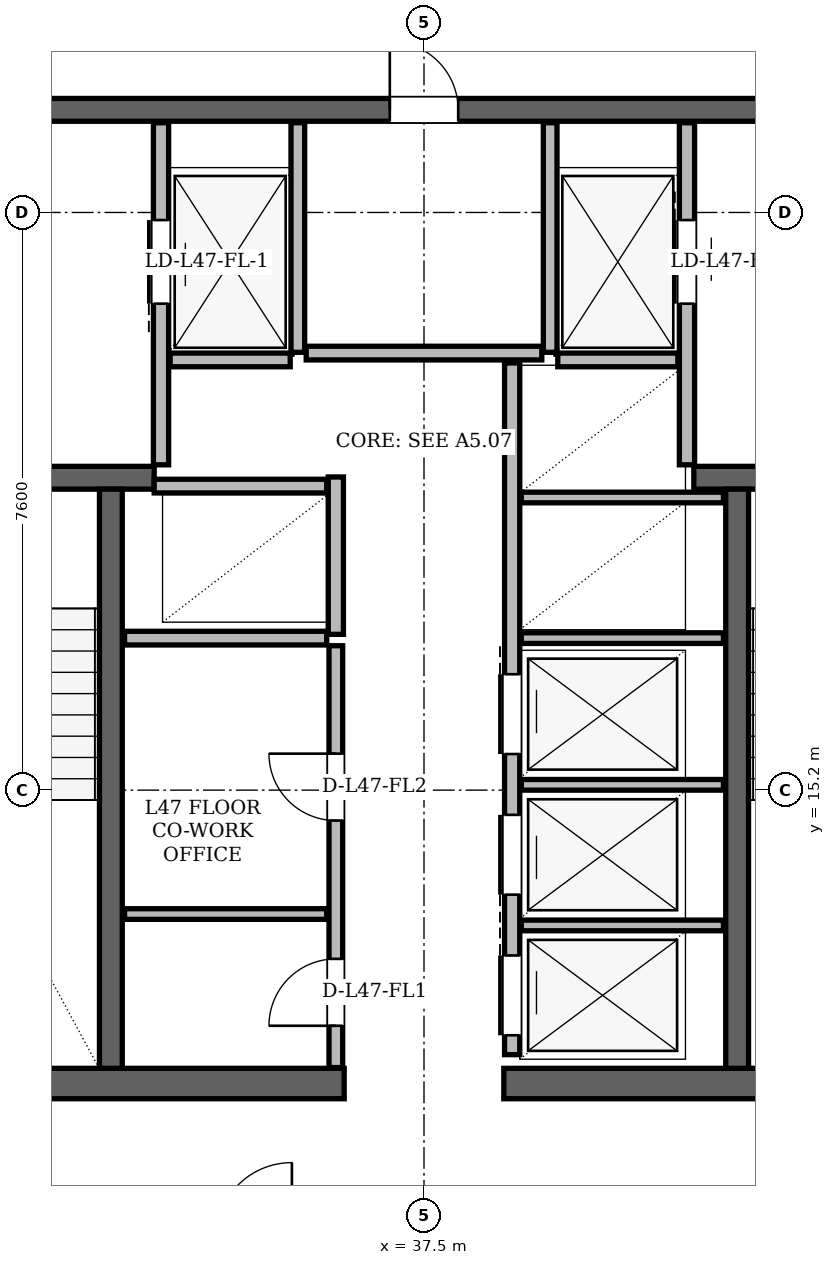
"""IFC4 building model, lengths in metres.
Left out: names, types, materials, properties, quantities, classifications, styles, units other than length and angle.
Written with IfcOpenShell. Run it as: python <this file> out.ifc"""

import sys

from ifc_helpers import new_model, si_unit, direction, frame, frame_2d, origin, place, context, subcontext, project, spatial, rectangle, extrude, element, fill, save


model = new_model("IFC4")
c1 = context("Model", 3, precision=1e-05, world=origin(), true_north=direction((0.0, 1.0)))
c2 = subcontext(c1, "Body", "Model", "MODEL_VIEW")
j1 = project(units=[si_unit("LENGTHUNIT", "METRE"), si_unit("PLANEANGLEUNIT", "RADIAN")], contexts=[c1])
p1 = place(None, origin())
s1 = spatial("IfcSite", under=j1, at=p1, CompositionType="ELEMENT")
p2 = place(p1, origin())
s2 = spatial("IfcBuilding", under=s1, at=p2, CompositionType="ELEMENT")
p3 = place(p2, frame((0.0, 0.0, 178.2)))
s3 = spatial("IfcBuildingStorey", under=s2, at=p3, CompositionType="ELEMENT", Elevation=178.2)
for number, where, z_axis, x_axis in (
    (1, (29.35, 11.34, 0.0), (0.0, 0.0, 1.0), (1.0, 0.0, 0.0)),
    (2, (38.55, 11.34, 0.0), (0.0, 0.0, 1.0), (1.0, 0.0, 0.0)),
):
    element("IfcWall", number, at=place(p3, frame(where, z_axis=z_axis, x_axis=x_axis)), inside=s3, PredefinedType="SHEAR", context=c2, shape_type="SweptSolid", body=[
        extrude(rectangle(XDim=7.1, YDim=0.4, at=frame_2d((3.55, 0.0))), origin(), (0.0, 0.0, 1.0), 3.38),
    ])
p4 = place(p3, frame((29.65, 24.15, 0.0), z_axis=(0.0, 0.0, 1.0), x_axis=(1.0, 0.0, 0.0)))
e3 = element("IfcWall", 3, at=p4, inside=s3, PredefinedType="SHEAR", context=c2, shape_type="SweptSolid", body=[
    extrude(rectangle(XDim=15.7, YDim=0.3, at=frame_2d((7.85, 0.0))), origin(), (0.0, 0.0, 1.0), 3.38),
])
p5 = place(p4, frame((1.7, 0.0, 0.0)))
e4 = element("IfcOpeningElement", 4, at=p5, cuts=e3, PredefinedType="OPENING", context=c2, shape_type="SweptSolid", body=[
    extrude(rectangle(XDim=1.2, YDim=2.2, at=frame_2d((0.6, 1.1))), frame((0.0, 0.15, 0.0), z_axis=(0.0, -1.0, 0.0), x_axis=(1.0, 0.0, 0.0)), (0.0, 0.0, 1.0), 0.3),
])
p6 = place(p4, frame((12.8, 0.0, 0.0)))
e5 = element("IfcOpeningElement", 5, at=p6, cuts=e3, PredefinedType="OPENING", context=c2, shape_type="SweptSolid", body=[
    extrude(rectangle(XDim=1.2, YDim=2.2, at=frame_2d((0.6, 1.1))), frame((0.0, 0.15, 0.0), z_axis=(0.0, -1.0, 0.0), x_axis=(1.0, 0.0, 0.0)), (0.0, 0.0, 1.0), 0.3),
])
p7 = place(p4, frame((7.4, 0.0, 0.0)))
e6 = element("IfcOpeningElement", 6, at=p7, cuts=e3, PredefinedType="OPENING", context=c2, shape_type="SweptSolid", body=[
    extrude(rectangle(XDim=0.9, YDim=2.05, at=frame_2d((0.45, 1.025))), frame((0.0, 0.15, 0.0), z_axis=(0.0, -1.0, 0.0), x_axis=(1.0, 0.0, 0.0)), (0.0, 0.0, 1.0), 0.3),
])
p8 = place(p3, frame((29.94, 19.31, 0.0), z_axis=(0.0, 0.0, 1.0), x_axis=(1.0, 0.0, 0.0)))
e7 = element("IfcWall", 7, at=p8, inside=s3, PredefinedType="SHEAR", context=c2, shape_type="SweptSolid", body=[
    extrude(rectangle(XDim=4.01, YDim=0.3, at=frame_2d((2.005, 0.0))), origin(), (0.0, 0.0, 1.0), 3.38),
])
p9 = place(p8, frame((1.01, 0.0, 0.0)))
e8 = element("IfcOpeningElement", 8, at=p9, cuts=e7, PredefinedType="OPENING", context=c2, shape_type="SweptSolid", body=[
    extrude(rectangle(XDim=1.4, YDim=2.2, at=frame_2d((0.7, 1.1))), frame((0.0, 0.15, 0.0), z_axis=(0.0, -1.0, 0.0), x_axis=(1.0, 0.0, 0.0)), (0.0, 0.0, 1.0), 0.3),
])
p10 = place(p3, frame((41.05, 19.31, 0.0), z_axis=(0.0, 0.0, 1.0), x_axis=(1.0, 0.0, 0.0)))
e9 = element("IfcWall", 9, at=p10, inside=s3, PredefinedType="SHEAR", context=c2, shape_type="SweptSolid", body=[
    extrude(rectangle(XDim=4.01, YDim=0.3, at=frame_2d((2.005, 0.0))), origin(), (0.0, 0.0, 1.0), 3.38),
])
p11 = place(p10, frame((1.6, 0.0, 0.0)))
e10 = element("IfcOpeningElement", 10, at=p11, cuts=e9, PredefinedType="OPENING", context=c2, shape_type="SweptSolid", body=[
    extrude(rectangle(XDim=1.4, YDim=2.2, at=frame_2d((0.7, 1.1))), frame((0.0, 0.15, 0.0), z_axis=(0.0, -1.0, 0.0), x_axis=(1.0, 0.0, 0.0)), (0.0, 0.0, 1.0), 0.3),
])
for number, where, z_axis, x_axis in (
    (11, (33.38, 11.54, 0.0), (0.0, 0.0, 1.0), (0.0, 1.0, 0.0)),
    (12, (41.62, 11.54, 0.0), (0.0, 0.0, 1.0), (0.0, 1.0, 0.0)),
):
    element("IfcWall", number, at=place(p3, frame(where, z_axis=z_axis, x_axis=x_axis)), inside=s3, PredefinedType="SHEAR", context=c2, shape_type="SweptSolid", body=[
        extrude(rectangle(XDim=7.62, YDim=0.3, at=frame_2d((3.81, 0.0))), origin(), (0.0, 0.0, 1.0), 3.38),
    ])
p12 = place(p3, frame((59.612, 12.087, 0.0), z_axis=(0.0, 0.0, 1.0), x_axis=(-0.499997641637, 0.866026765382, 0.0)))
e13 = element("IfcWall", 13, at=p12, inside=s3, PredefinedType="SOLIDWALL", context=c2, shape_type="SweptSolid", body=[
    extrude(rectangle(XDim=35.992, YDim=0.29, at=frame_2d((17.996, 0.0))), origin(), (0.0, 0.0, 1.0), 2.6),
])
p13 = place(p12, frame((8.034, 0.0, 0.0)))
e14 = element("IfcOpeningElement", 14, at=p13, cuts=e13, PredefinedType="OPENING", context=c2, shape_type="SweptSolid", body=[
    extrude(rectangle(XDim=1.5, YDim=2.2, at=frame_2d((0.75, 1.1))), frame((0.0, 0.145, 0.0), z_axis=(0.0, -1.0, 0.0), x_axis=(1.0, 0.0, 0.0)), (0.0, 0.0, 1.0), 0.29),
])
p14 = place(p12, frame((31.062, 0.0, 0.0)))
e15 = element("IfcOpeningElement", 15, at=p14, cuts=e13, PredefinedType="OPENING", context=c2, shape_type="SweptSolid", body=[
    extrude(rectangle(XDim=1.5, YDim=2.2, at=frame_2d((0.75, 1.1))), frame((0.0, 0.145, 0.0), z_axis=(0.0, -1.0, 0.0), x_axis=(1.0, 0.0, 0.0)), (0.0, 0.0, 1.0), 0.29),
])
p15 = place(p12, frame((28.16, 0.0, 0.85)))
e16 = element("IfcOpeningElement", 16, at=p15, cuts=e13, PredefinedType="OPENING", context=c2, shape_type="SweptSolid", body=[
    extrude(rectangle(XDim=1.2, YDim=1.48, at=frame_2d((0.6, 0.74))), frame((0.0, 0.145, 0.0), z_axis=(0.0, -1.0, 0.0), x_axis=(1.0, 0.0, 0.0)), (0.0, 0.0, 1.0), 0.29),
])
p16 = place(p12, frame((33.069, 0.0, 0.85)))
e17 = element("IfcOpeningElement", 17, at=p16, cuts=e13, PredefinedType="OPENING", context=c2, shape_type="SweptSolid", body=[
    extrude(rectangle(XDim=1.2, YDim=1.48, at=frame_2d((0.6, 0.74))), frame((0.0, 0.145, 0.0), z_axis=(0.0, -1.0, 0.0), x_axis=(1.0, 0.0, 0.0)), (0.0, 0.0, 1.0), 0.29),
])
p17 = place(p12, frame((14.916, 0.0, 0.85)))
e18 = element("IfcOpeningElement", 18, at=p17, cuts=e13, PredefinedType="OPENING", context=c2, shape_type="SweptSolid", body=[
    extrude(rectangle(XDim=1.4, YDim=1.6, at=frame_2d((0.7, 0.8))), frame((0.0, 0.145, 0.0), z_axis=(0.0, -1.0, 0.0), x_axis=(1.0, 0.0, 0.0)), (0.0, 0.0, 1.0), 0.29),
])
p18 = place(p12, frame((17.971, 0.0, 0.85)))
e19 = element("IfcOpeningElement", 19, at=p18, cuts=e13, PredefinedType="OPENING", context=c2, shape_type="SweptSolid", body=[
    extrude(rectangle(XDim=1.2, YDim=1.48, at=frame_2d((0.6, 0.74))), frame((0.0, 0.145, 0.0), z_axis=(0.0, -1.0, 0.0), x_axis=(1.0, 0.0, 0.0)), (0.0, 0.0, 1.0), 0.29),
])
p19 = place(p12, frame((21.213, 0.0, 0.85)))
e20 = element("IfcOpeningElement", 20, at=p19, cuts=e13, PredefinedType="OPENING", context=c2, shape_type="SweptSolid", body=[
    extrude(rectangle(XDim=1.2, YDim=1.48, at=frame_2d((0.6, 0.74))), frame((0.0, 0.145, 0.0), z_axis=(0.0, -1.0, 0.0), x_axis=(1.0, 0.0, 0.0)), (0.0, 0.0, 1.0), 0.29),
])
p20 = place(p12, frame((26.453, 0.0, 0.85)))
e21 = element("IfcOpeningElement", 21, at=p20, cuts=e13, PredefinedType="OPENING", context=c2, shape_type="SweptSolid", body=[
    extrude(rectangle(XDim=1.2, YDim=1.48, at=frame_2d((0.6, 0.74))), frame((0.0, 0.145, 0.0), z_axis=(0.0, -1.0, 0.0), x_axis=(1.0, 0.0, 0.0)), (0.0, 0.0, 1.0), 0.29),
])
p21 = place(p3, frame((33.384, 43.257, 0.0), z_axis=(0.0, 0.0, 1.0), x_axis=(-0.499997641637, -0.866026765382, 0.0)))
e22 = element("IfcWall", 22, at=p21, inside=s3, PredefinedType="SOLIDWALL", context=c2, shape_type="SweptSolid", body=[
    extrude(rectangle(XDim=35.992, YDim=0.29, at=frame_2d((17.996, 0.0))), origin(), (0.0, 0.0, 1.0), 2.6),
])
p22 = place(p21, frame((8.034, 0.0, 0.0)))
e23 = element("IfcOpeningElement", 23, at=p22, cuts=e22, PredefinedType="OPENING", context=c2, shape_type="SweptSolid", body=[
    extrude(rectangle(XDim=1.5, YDim=2.2, at=frame_2d((0.75, 1.1))), frame((0.0, 0.145, 0.0), z_axis=(0.0, -1.0, 0.0), x_axis=(1.0, 0.0, 0.0)), (0.0, 0.0, 1.0), 0.29),
])
p23 = place(p21, frame((27.913, 0.0, 0.0)))
e24 = element("IfcOpeningElement", 24, at=p23, cuts=e22, PredefinedType="OPENING", context=c2, shape_type="SweptSolid", body=[
    extrude(rectangle(XDim=1.5, YDim=2.2, at=frame_2d((0.75, 1.1))), frame((0.0, 0.145, 0.0), z_axis=(0.0, -1.0, 0.0), x_axis=(1.0, 0.0, 0.0)), (0.0, 0.0, 1.0), 0.29),
])
p24 = place(p21, frame((33.875, 0.0, 0.85)))
e25 = element("IfcOpeningElement", 25, at=p24, cuts=e22, PredefinedType="OPENING", context=c2, shape_type="SweptSolid", body=[
    extrude(rectangle(XDim=1.2, YDim=1.48, at=frame_2d((0.6, 0.74))), frame((0.0, 0.145, 0.0), z_axis=(0.0, -1.0, 0.0), x_axis=(1.0, 0.0, 0.0)), (0.0, 0.0, 1.0), 0.29),
])
p25 = place(p21, frame((18.191, 0.0, 0.85)))
e26 = element("IfcOpeningElement", 26, at=p25, cuts=e22, PredefinedType="OPENING", context=c2, shape_type="SweptSolid", body=[
    extrude(rectangle(XDim=2.6, YDim=1.64, at=frame_2d((1.3, 0.82))), frame((0.0, 0.145, 0.0), z_axis=(0.0, -1.0, 0.0), x_axis=(1.0, 0.0, 0.0)), (0.0, 0.0, 1.0), 0.29),
])
p26 = place(p21, frame((26.178, 0.0, 0.85)))
e27 = element("IfcOpeningElement", 27, at=p26, cuts=e22, PredefinedType="OPENING", context=c2, shape_type="SweptSolid", body=[
    extrude(rectangle(XDim=1.2, YDim=1.48, at=frame_2d((0.6, 0.74))), frame((0.0, 0.145, 0.0), z_axis=(0.0, -1.0, 0.0), x_axis=(1.0, 0.0, 0.0)), (0.0, 0.0, 1.0), 0.29),
])
p27 = place(p21, frame((12.657, 0.0, 0.85)))
e28 = element("IfcOpeningElement", 28, at=p27, cuts=e22, PredefinedType="OPENING", context=c2, shape_type="SweptSolid", body=[
    extrude(rectangle(XDim=1.2, YDim=1.48, at=frame_2d((0.6, 0.74))), frame((0.0, 0.145, 0.0), z_axis=(0.0, -1.0, 0.0), x_axis=(1.0, 0.0, 0.0)), (0.0, 0.0, 1.0), 0.29),
])
p28 = place(p21, frame((14.939, 0.0, 0.85)))
e29 = element("IfcOpeningElement", 29, at=p28, cuts=e22, PredefinedType="OPENING", context=c2, shape_type="SweptSolid", body=[
    extrude(rectangle(XDim=1.8, YDim=1.64, at=frame_2d((0.9, 0.82))), frame((0.0, 0.145, 0.0), z_axis=(0.0, -1.0, 0.0), x_axis=(1.0, 0.0, 0.0)), (0.0, 0.0, 1.0), 0.29),
])
p29 = place(p21, frame((2.236, 0.0, 0.85)))
e30 = element("IfcOpeningElement", 30, at=p29, cuts=e22, PredefinedType="OPENING", context=c2, shape_type="SweptSolid", body=[
    extrude(rectangle(XDim=2.0, YDim=1.64, at=frame_2d((1.0, 0.82))), frame((0.0, 0.145, 0.0), z_axis=(0.0, -1.0, 0.0), x_axis=(1.0, 0.0, 0.0)), (0.0, 0.0, 1.0), 0.29),
])
p30 = place(p3, frame((34.04, 19.48, 0.0), z_axis=(0.0, 0.0, 1.0), x_axis=(0.0, 1.0, 0.0)))
e31 = element("IfcWall", 31, at=p30, inside=s3, PredefinedType="PARTITIONING", context=c2, shape_type="SweptSolid", body=[
    extrude(rectangle(XDim=4.5, YDim=0.2, at=frame_2d((2.25, 0.0))), origin(), (0.0, 0.0, 1.0), 3.38),
])
p31 = place(p30, frame((2.12, 0.0, 0.0)))
e32 = element("IfcOpeningElement", 32, at=p31, cuts=e31, PredefinedType="OPENING", context=c2, shape_type="SweptSolid", body=[
    extrude(rectangle(XDim=1.1, YDim=2.2, at=frame_2d((0.55, 1.1))), frame((0.0, 0.1, 0.0), z_axis=(0.0, -1.0, 0.0), x_axis=(1.0, 0.0, 0.0)), (0.0, 0.0, 1.0), 0.2),
])
p32 = place(p3, frame((35.84, 20.96, 0.0), z_axis=(0.0, 0.0, 1.0), x_axis=(0.0, 1.0, 0.0)))
e33 = element("IfcWall", 33, at=p32, inside=s3, PredefinedType="PARTITIONING", context=c2, shape_type="SweptSolid", body=[
    extrude(rectangle(XDim=3.02, YDim=0.18, at=frame_2d((1.51, 0.0))), origin(), (0.0, 0.0, 1.0), 3.38),
])
p33 = place(p3, frame((34.16, 20.86, 0.0), z_axis=(0.0, 0.0, 1.0), x_axis=(1.0, 0.0, 0.0)))
e34 = element("IfcWall", 34, at=p33, inside=s3, PredefinedType="PARTITIONING", context=c2, shape_type="SweptSolid", body=[
    extrude(rectangle(XDim=1.58, YDim=0.18, at=frame_2d((0.79, 0.0))), origin(), (0.0, 0.0, 1.0), 3.38),
])
p34 = place(p3, frame((40.96, 19.48, 0.0), z_axis=(0.0, 0.0, 1.0), x_axis=(0.0, 1.0, 0.0)))
e35 = element("IfcWall", 35, at=p34, inside=s3, PredefinedType="PARTITIONING", context=c2, shape_type="SweptSolid", body=[
    extrude(rectangle(XDim=4.5, YDim=0.2, at=frame_2d((2.25, 0.0))), origin(), (0.0, 0.0, 1.0), 3.38),
])
p35 = place(p34, frame((2.12, 0.0, 0.0)))
e36 = element("IfcOpeningElement", 36, at=p35, cuts=e35, PredefinedType="OPENING", context=c2, shape_type="SweptSolid", body=[
    extrude(rectangle(XDim=1.1, YDim=2.2, at=frame_2d((0.55, 1.1))), frame((0.0, 0.1, 0.0), z_axis=(0.0, -1.0, 0.0), x_axis=(1.0, 0.0, 0.0)), (0.0, 0.0, 1.0), 0.2),
])
p36 = place(p3, frame((39.16, 20.96, 0.0), z_axis=(0.0, 0.0, 1.0), x_axis=(0.0, 1.0, 0.0)))
e37 = element("IfcWall", 37, at=p36, inside=s3, PredefinedType="PARTITIONING", context=c2, shape_type="SweptSolid", body=[
    extrude(rectangle(XDim=3.02, YDim=0.18, at=frame_2d((1.51, 0.0))), origin(), (0.0, 0.0, 1.0), 3.38),
])
p37 = place(p3, frame((39.26, 20.86, 0.0), z_axis=(0.0, 0.0, 1.0), x_axis=(1.0, 0.0, 0.0)))
e38 = element("IfcWall", 38, at=p37, inside=s3, PredefinedType="PARTITIONING", context=c2, shape_type="SweptSolid", body=[
    extrude(rectangle(XDim=1.58, YDim=0.18, at=frame_2d((0.79, 0.0))), origin(), (0.0, 0.0, 1.0), 3.38),
])
p38 = place(p3, frame((36.34, 17.25, 0.0), z_axis=(0.0, 0.0, 1.0), x_axis=(0.0, 1.0, 0.0)))
e39 = element("IfcWall", 39, at=p38, inside=s3, PredefinedType="PARTITIONING", context=c2, shape_type="SweptSolid", body=[
    extrude(rectangle(XDim=2.07, YDim=0.2, at=frame_2d((1.035, 0.0))), origin(), (0.0, 0.0, 1.0), 3.38),
])
p39 = place(p3, frame((33.95, 19.2, 0.0), z_axis=(0.0, 0.0, 1.0), x_axis=(1.0, 0.0, 0.0)))
e40 = element("IfcWall", 40, at=p39, inside=s3, PredefinedType="PARTITIONING", context=c2, shape_type="SweptSolid", body=[
    extrude(rectangle(XDim=2.27, YDim=0.18, at=frame_2d((1.135, 0.0))), origin(), (0.0, 0.0, 1.0), 3.38),
])
p40 = place(p3, frame((33.56, 17.2, 0.0), z_axis=(0.0, 0.0, 1.0), x_axis=(1.0, 0.0, 0.0)))
e41 = element("IfcWall", 41, at=p40, inside=s3, PredefinedType="PARTITIONING", context=c2, shape_type="SweptSolid", body=[
    extrude(rectangle(XDim=2.66, YDim=0.18, at=frame_2d((1.33, 0.0))), origin(), (0.0, 0.0, 1.0), 3.38),
])
p41 = place(p3, frame((36.34, 11.55, 0.0), z_axis=(0.0, 0.0, 1.0), x_axis=(0.0, 1.0, 0.0)))
e42 = element("IfcWall", 42, at=p41, inside=s3, PredefinedType="PARTITIONING", context=c2, shape_type="SweptSolid", body=[
    extrude(rectangle(XDim=5.55, YDim=0.18, at=frame_2d((2.775, 0.0))), origin(), (0.0, 0.0, 1.0), 3.38),
])
p42 = place(p41, frame((0.55, 0.0, 0.0)))
e43 = element("IfcOpeningElement", 43, at=p42, cuts=e42, PredefinedType="OPENING", context=c2, shape_type="SweptSolid", body=[
    extrude(rectangle(XDim=0.88, YDim=2.08, at=frame_2d((0.44, 1.04))), frame((0.0, 0.09, 0.0), z_axis=(0.0, -1.0, 0.0), x_axis=(1.0, 0.0, 0.0)), (0.0, 0.0, 1.0), 0.18),
])
p43 = place(p41, frame((3.25, 0.0, 0.0)))
e44 = element("IfcOpeningElement", 44, at=p43, cuts=e42, PredefinedType="OPENING", context=c2, shape_type="SweptSolid", body=[
    extrude(rectangle(XDim=0.88, YDim=2.08, at=frame_2d((0.44, 1.04))), frame((0.0, 0.09, 0.0), z_axis=(0.0, -1.0, 0.0), x_axis=(1.0, 0.0, 0.0)), (0.0, 0.0, 1.0), 0.18),
])
p44 = place(p3, frame((33.56, 13.57, 0.0), z_axis=(0.0, 0.0, 1.0), x_axis=(1.0, 0.0, 0.0)))
e45 = element("IfcWall", 45, at=p44, inside=s3, PredefinedType="PARTITIONING", context=c2, shape_type="SweptSolid", body=[
    extrude(rectangle(XDim=2.66, YDim=0.14, at=frame_2d((1.33, 0.0))), origin(), (0.0, 0.0, 1.0), 3.38),
])
p45 = place(p3, frame((38.66, 11.72, 0.0), z_axis=(0.0, 0.0, 1.0), x_axis=(0.0, 1.0, 0.0)))
e46 = element("IfcWall", 46, at=p45, inside=s3, PredefinedType="PARTITIONING", context=c2, shape_type="SweptSolid", body=[
    extrude(rectangle(XDim=9.1, YDim=0.2, at=frame_2d((4.55, 0.0))), origin(), (0.0, 0.0, 1.0), 3.38),
])
p46 = place(p45, frame((0.255, 0.0, 0.0)))
e47 = element("IfcOpeningElement", 47, at=p46, cuts=e46, PredefinedType="OPENING", context=c2, shape_type="SweptSolid", body=[
    extrude(rectangle(XDim=1.05, YDim=2.15, at=frame_2d((0.525, 1.075))), frame((0.0, 0.1, 0.0), z_axis=(0.0, -1.0, 0.0), x_axis=(1.0, 0.0, 0.0)), (0.0, 0.0, 1.0), 0.2),
])
p47 = place(p45, frame((2.105, 0.0, 0.0)))
e48 = element("IfcOpeningElement", 48, at=p47, cuts=e46, PredefinedType="OPENING", context=c2, shape_type="SweptSolid", body=[
    extrude(rectangle(XDim=1.05, YDim=2.15, at=frame_2d((0.525, 1.075))), frame((0.0, 0.1, 0.0), z_axis=(0.0, -1.0, 0.0), x_axis=(1.0, 0.0, 0.0)), (0.0, 0.0, 1.0), 0.2),
])
p48 = place(p45, frame((3.955, 0.0, 0.0)))
e49 = element("IfcOpeningElement", 49, at=p48, cuts=e46, PredefinedType="OPENING", context=c2, shape_type="SweptSolid", body=[
    extrude(rectangle(XDim=1.05, YDim=2.15, at=frame_2d((0.525, 1.075))), frame((0.0, 0.1, 0.0), z_axis=(0.0, -1.0, 0.0), x_axis=(1.0, 0.0, 0.0)), (0.0, 0.0, 1.0), 0.2),
])
for number, where, z_axis, x_axis in (
    (50, (38.78, 13.42, 0.0), (0.0, 0.0, 1.0), (1.0, 0.0, 0.0)),
    (51, (38.78, 15.27, 0.0), (0.0, 0.0, 1.0), (1.0, 0.0, 0.0)),
    (52, (38.78, 17.2, 0.0), (0.0, 0.0, 1.0), (1.0, 0.0, 0.0)),
    (53, (38.78, 19.05, 0.0), (0.0, 0.0, 1.0), (1.0, 0.0, 0.0)),
):
    element("IfcWall", number, at=place(p3, frame(where, z_axis=z_axis, x_axis=x_axis)), inside=s3, PredefinedType="PARTITIONING", context=c2, shape_type="SweptSolid", body=[
        extrude(rectangle(XDim=2.66, YDim=0.14, at=frame_2d((1.33, 0.0))), origin(), (0.0, 0.0, 1.0), 3.38),
    ])
p49 = place(p3, frame((35.95, 20.95, 0.0), z_axis=(0.0, 0.0, 1.0), x_axis=(1.0, 0.0, 0.0)))
e54 = element("IfcWall", 54, at=p49, inside=s3, PredefinedType="PARTITIONING", context=c2, shape_type="SweptSolid", body=[
    extrude(rectangle(XDim=3.1, YDim=0.18, at=frame_2d((1.55, 0.0))), origin(), (0.0, 0.0, 1.0), 3.38),
])
p50 = place(p42, origin())
e55 = element("IfcDoor", 55, at=p50, inside=s3, OperationType="SINGLE_SWING_LEFT", PredefinedType="DOOR", context=c2, shape_type="SweptSolid", body=[
    extrude(rectangle(XDim=0.88, YDim=2.08, at=frame_2d((0.44, 1.04))), frame((0.0, 0.025, 0.0), z_axis=(0.0, -1.0, 0.0), x_axis=(1.0, 0.0, 0.0)), (0.0, 0.0, 1.0), 0.05),
])
fill(e43, e55)
p51 = place(p43, origin())
e56 = element("IfcDoor", 56, at=p51, inside=s3, OperationType="SINGLE_SWING_RIGHT", PredefinedType="DOOR", context=c2, shape_type="SweptSolid", body=[
    extrude(rectangle(XDim=0.88, YDim=2.08, at=frame_2d((0.44, 1.04))), frame((0.0, 0.025, 0.0), z_axis=(0.0, -1.0, 0.0), x_axis=(1.0, 0.0, 0.0)), (0.0, 0.0, 1.0), 0.05),
])
fill(e44, e56)
p52 = place(p31, origin())
e57 = element("IfcDoor", 57, at=p52, inside=s3, OperationType="SLIDING_TO_LEFT", PredefinedType="DOOR", context=c2, shape_type="SweptSolid", body=[
    extrude(rectangle(XDim=1.1, YDim=2.2, at=frame_2d((0.55, 1.1))), frame((0.0, 0.025, 0.0), z_axis=(0.0, -1.0, 0.0), x_axis=(1.0, 0.0, 0.0)), (0.0, 0.0, 1.0), 0.05),
])
fill(e32, e57)
p53 = place(p35, origin())
e58 = element("IfcDoor", 58, at=p53, inside=s3, OperationType="SLIDING_TO_RIGHT", PredefinedType="DOOR", context=c2, shape_type="SweptSolid", body=[
    extrude(rectangle(XDim=1.1, YDim=2.2, at=frame_2d((0.55, 1.1))), frame((0.0, 0.025, 0.0), z_axis=(0.0, -1.0, 0.0), x_axis=(1.0, 0.0, 0.0)), (0.0, 0.0, 1.0), 0.05),
])
fill(e36, e58)
p54 = place(p46, origin())
e59 = element("IfcDoor", 59, at=p54, inside=s3, OperationType="SLIDING_TO_RIGHT", PredefinedType="DOOR", context=c2, shape_type="SweptSolid", body=[
    extrude(rectangle(XDim=1.05, YDim=2.15, at=frame_2d((0.525, 1.075))), frame((0.0, 0.025, 0.0), z_axis=(0.0, -1.0, 0.0), x_axis=(1.0, 0.0, 0.0)), (0.0, 0.0, 1.0), 0.05),
])
fill(e47, e59)
p55 = place(p47, origin())
e60 = element("IfcDoor", 60, at=p55, inside=s3, OperationType="SLIDING_TO_LEFT", PredefinedType="DOOR", context=c2, shape_type="SweptSolid", body=[
    extrude(rectangle(XDim=1.05, YDim=2.15, at=frame_2d((0.525, 1.075))), frame((0.0, 0.025, 0.0), z_axis=(0.0, -1.0, 0.0), x_axis=(1.0, 0.0, 0.0)), (0.0, 0.0, 1.0), 0.05),
])
fill(e48, e60)
p56 = place(p48, origin())
e61 = element("IfcDoor", 61, at=p56, inside=s3, OperationType="SLIDING_TO_RIGHT", PredefinedType="DOOR", context=c2, shape_type="SweptSolid", body=[
    extrude(rectangle(XDim=1.05, YDim=2.15, at=frame_2d((0.525, 1.075))), frame((0.0, 0.025, 0.0), z_axis=(0.0, -1.0, 0.0), x_axis=(1.0, 0.0, 0.0)), (0.0, 0.0, 1.0), 0.05),
])
fill(e49, e61)
p57 = place(p7, origin())
e62 = element("IfcDoor", 62, at=p57, inside=s3, OperationType="SINGLE_SWING_LEFT", PredefinedType="DOOR", context=c2, shape_type="SweptSolid", body=[
    extrude(rectangle(XDim=0.9, YDim=2.05, at=frame_2d((0.45, 1.025))), frame((0.0, 0.025, 0.0), z_axis=(0.0, -1.0, 0.0), x_axis=(1.0, 0.0, 0.0)), (0.0, 0.0, 1.0), 0.05),
])
fill(e6, e62)
save(model, sys.argv[1])
